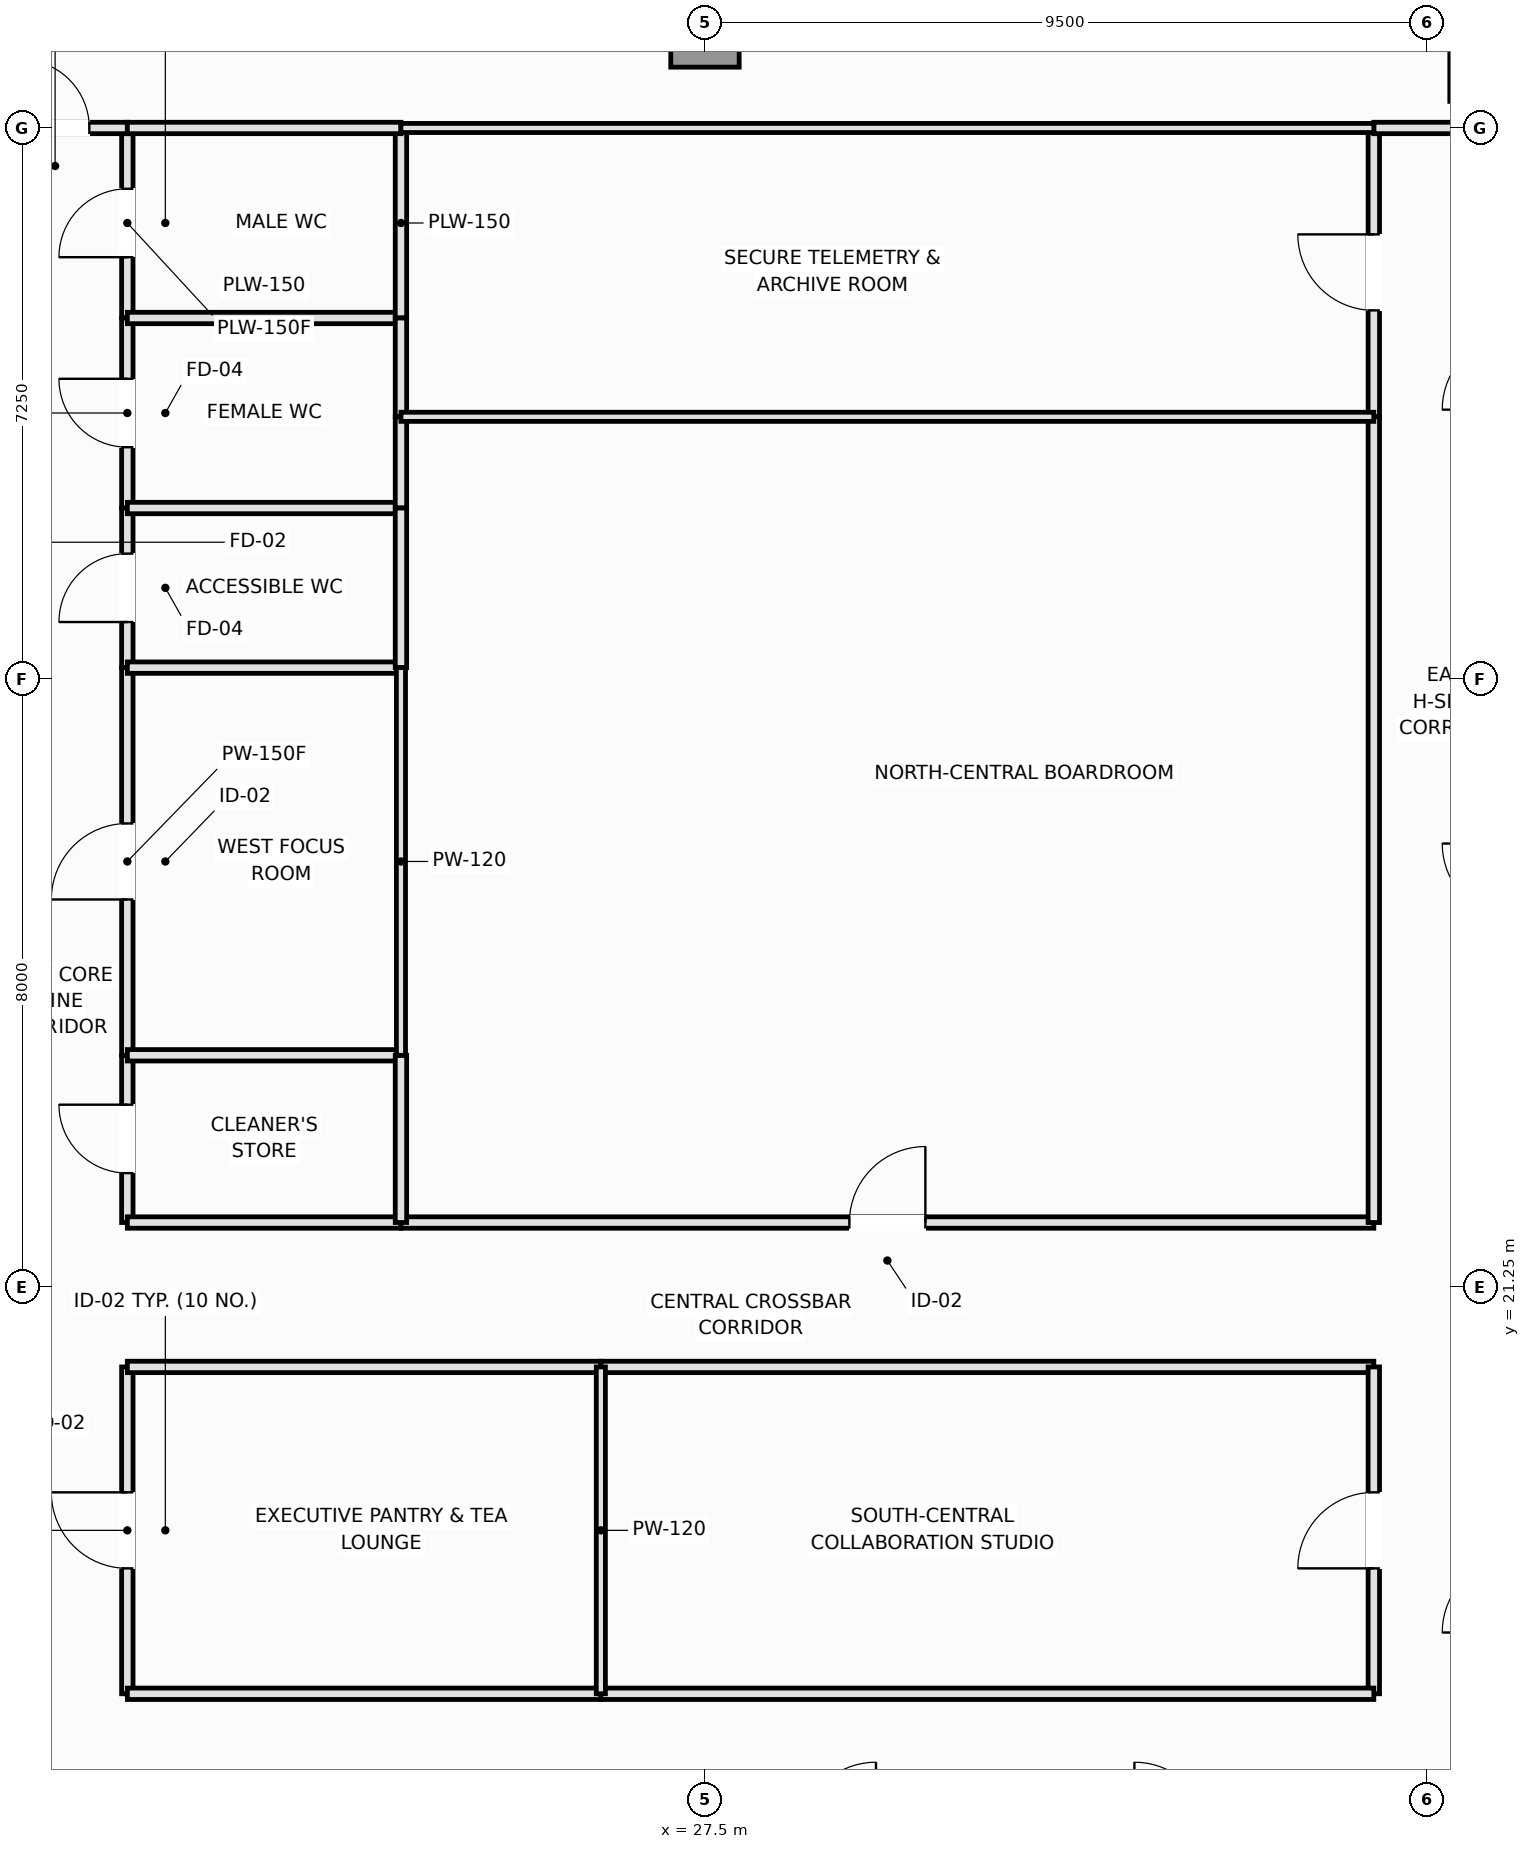
"""IFC4 building model, lengths in metres.
Left out: names, types, materials, properties, quantities, classifications, styles, units other than length and angle.
Written with IfcOpenShell. Run it as: python <this file> out.ifc"""

import sys

from ifc_helpers import new_model, si_unit, direction, frame, frame_2d, origin, origin_2d, place, context, subcontext, project, spatial, rectangle, extrude, element, fill, save


model = new_model("IFC4")
c1 = context("Model", 3, precision=1e-05, world=origin(), true_north=direction((0.0, 1.0)))
c2 = subcontext(c1, "Body", "Model", "MODEL_VIEW")
j1 = project(units=[si_unit("LENGTHUNIT", "METRE"), si_unit("PLANEANGLEUNIT", "RADIAN")], contexts=[c1])
p1 = place(None, origin())
s1 = spatial("IfcSite", under=j1, at=p1, CompositionType="ELEMENT")
p2 = place(p1, origin())
s2 = spatial("IfcBuilding", under=s1, at=p2, CompositionType="ELEMENT")
p3 = place(p2, frame((0.0, 0.0, 270.55)))
s3 = spatial("IfcBuildingStorey", under=s2, at=p3, CompositionType="ELEMENT", Elevation=270.55)
p4 = place(p3, frame((27.5, 37.75, 0.0), z_axis=(0.0, 0.0, 1.0), x_axis=(1.0, 0.0, 0.0)))
e1 = element("IfcColumn", 1, at=p4, inside=s3, PredefinedType="COLUMN", context=c2, shape_type="SweptSolid", body=[
    extrude(rectangle(XDim=0.9, YDim=0.9, at=origin_2d()), origin(), (0.0, 0.0, 1.0), 3.55),
])
p5 = place(p3, frame((19.9, 15.9, 0.0), z_axis=(0.0, 0.0, 1.0), x_axis=(0.0, 1.0, 0.0)))
e2 = element("IfcWall", 2, at=p5, inside=s3, PredefinedType="PARTITIONING", context=c2, shape_type="SweptSolid", body=[
    extrude(rectangle(XDim=4.3, YDim=0.15, at=frame_2d((2.15, 0.0))), origin(), (0.0, 0.0, 1.0), 3.39),
])
p6 = place(p5, frame((1.65, 0.0, 0.0)))
e3 = element("IfcOpeningElement", 3, at=p6, cuts=e2, PredefinedType="OPENING", context=c2, shape_type="SweptSolid", body=[
    extrude(rectangle(XDim=1.0, YDim=2.15, at=frame_2d((0.5, 1.075))), frame((0.0, 0.085, 0.0), z_axis=(0.0, -1.0, 0.0), x_axis=(1.0, 0.0, 0.0)), (0.0, 0.0, 1.0), 0.17),
])
p7 = place(p3, frame((19.9, 34.0, 0.0), z_axis=(0.0, 0.0, 1.0), x_axis=(0.0, 1.0, 0.0)))
e4 = element("IfcWall", 4, at=p7, inside=s3, PredefinedType="PLUMBINGWALL", context=c2, shape_type="SweptSolid", body=[
    extrude(rectangle(XDim=2.5, YDim=0.15, at=frame_2d((1.25, 0.0))), origin(), (0.0, 0.0, 1.0), 3.39),
])
p8 = place(p7, frame((0.8, 0.0, 0.0)))
e5 = element("IfcOpeningElement", 5, at=p8, cuts=e4, PredefinedType="OPENING", context=c2, shape_type="SweptSolid", body=[
    extrude(rectangle(XDim=0.9, YDim=2.1, at=frame_2d((0.45, 1.05))), frame((0.0, 0.085, 0.0), z_axis=(0.0, -1.0, 0.0), x_axis=(1.0, 0.0, 0.0)), (0.0, 0.0, 1.0), 0.17),
])
p9 = place(p3, frame((19.9, 31.5, 0.0), z_axis=(0.0, 0.0, 1.0), x_axis=(0.0, 1.0, 0.0)))
e6 = element("IfcWall", 6, at=p9, inside=s3, PredefinedType="PLUMBINGWALL", context=c2, shape_type="SweptSolid", body=[
    extrude(rectangle(XDim=2.5, YDim=0.15, at=frame_2d((1.25, 0.0))), origin(), (0.0, 0.0, 1.0), 3.39),
])
p10 = place(p9, frame((0.8, 0.0, 0.0)))
e7 = element("IfcOpeningElement", 7, at=p10, cuts=e6, PredefinedType="OPENING", context=c2, shape_type="SweptSolid", body=[
    extrude(rectangle(XDim=0.9, YDim=2.1, at=frame_2d((0.45, 1.05))), frame((0.0, 0.085, 0.0), z_axis=(0.0, -1.0, 0.0), x_axis=(1.0, 0.0, 0.0)), (0.0, 0.0, 1.0), 0.17),
])
p11 = place(p3, frame((19.9, 29.4, 0.0), z_axis=(0.0, 0.0, 1.0), x_axis=(0.0, 1.0, 0.0)))
e8 = element("IfcWall", 8, at=p11, inside=s3, PredefinedType="PLUMBINGWALL", context=c2, shape_type="SweptSolid", body=[
    extrude(rectangle(XDim=2.1, YDim=0.15, at=frame_2d((1.05, 0.0))), origin(), (0.0, 0.0, 1.0), 3.39),
])
p12 = place(p11, frame((0.6, 0.0, 0.0)))
e9 = element("IfcOpeningElement", 9, at=p12, cuts=e8, PredefinedType="OPENING", context=c2, shape_type="SweptSolid", body=[
    extrude(rectangle(XDim=0.9, YDim=2.1, at=frame_2d((0.45, 1.05))), frame((0.0, 0.085, 0.0), z_axis=(0.0, -1.0, 0.0), x_axis=(1.0, 0.0, 0.0)), (0.0, 0.0, 1.0), 0.17),
])
p13 = place(p3, frame((19.9, 22.1, 0.0), z_axis=(0.0, 0.0, 1.0), x_axis=(0.0, 1.0, 0.0)))
e10 = element("IfcWall", 10, at=p13, inside=s3, PredefinedType="PLUMBINGWALL", context=c2, shape_type="SweptSolid", body=[
    extrude(rectangle(XDim=2.2, YDim=0.15, at=frame_2d((1.1, 0.0))), origin(), (0.0, 0.0, 1.0), 3.39),
])
p14 = place(p13, frame((0.65, 0.0, 0.0)))
e11 = element("IfcOpeningElement", 11, at=p14, cuts=e10, PredefinedType="OPENING", context=c2, shape_type="SweptSolid", body=[
    extrude(rectangle(XDim=0.9, YDim=2.1, at=frame_2d((0.45, 1.05))), frame((0.0, 0.085, 0.0), z_axis=(0.0, -1.0, 0.0), x_axis=(1.0, 0.0, 0.0)), (0.0, 0.0, 1.0), 0.17),
])
p15 = place(p3, frame((19.9, 24.3, 0.0), z_axis=(0.0, 0.0, 1.0), x_axis=(0.0, 1.0, 0.0)))
e12 = element("IfcWall", 12, at=p15, inside=s3, PredefinedType="PARTITIONING", context=c2, shape_type="SweptSolid", body=[
    extrude(rectangle(XDim=5.1, YDim=0.15, at=frame_2d((2.55, 0.0))), origin(), (0.0, 0.0, 1.0), 3.39),
])
p16 = place(p15, frame((2.05, 0.0, 0.0)))
e13 = element("IfcOpeningElement", 13, at=p16, cuts=e12, PredefinedType="OPENING", context=c2, shape_type="SweptSolid", body=[
    extrude(rectangle(XDim=1.0, YDim=2.15, at=frame_2d((0.5, 1.075))), frame((0.0, 0.085, 0.0), z_axis=(0.0, -1.0, 0.0), x_axis=(1.0, 0.0, 0.0)), (0.0, 0.0, 1.0), 0.17),
])
p17 = place(p3, frame((18.0, 36.5, 0.0), z_axis=(0.0, 0.0, 1.0), x_axis=(1.0, 0.0, 0.0)))
e14 = element("IfcWall", 14, at=p17, inside=s3, PredefinedType="PARTITIONING", context=c2, shape_type="SweptSolid", body=[
    extrude(rectangle(XDim=1.9, YDim=0.15, at=frame_2d((0.95, 0.0))), origin(), (0.0, 0.0, 1.0), 3.39),
])
p18 = place(p17, frame((0.5, 0.0, 0.0)))
e15 = element("IfcOpeningElement", 15, at=p18, cuts=e14, PredefinedType="OPENING", context=c2, shape_type="SweptSolid", body=[
    extrude(rectangle(XDim=0.9, YDim=2.1, at=frame_2d((0.45, 1.05))), frame((0.0, 0.085, 0.0), z_axis=(0.0, -1.0, 0.0), x_axis=(1.0, 0.0, 0.0)), (0.0, 0.0, 1.0), 0.17),
])
p19 = place(p3, frame((19.9, 20.2, 0.0), z_axis=(0.0, 0.0, 1.0), x_axis=(1.0, 0.0, 0.0)))
e16 = element("IfcWall", 16, at=p19, inside=s3, PredefinedType="PARTITIONING", context=c2, shape_type="SweptSolid", body=[
    extrude(rectangle(XDim=6.23, YDim=0.15, at=frame_2d((3.115, 0.0))), origin(), (0.0, 0.0, 1.0), 3.39),
])
p20 = place(p3, frame((26.13, 20.2, 0.0), z_axis=(0.0, 0.0, 1.0), x_axis=(1.0, 0.0, 0.0)))
e17 = element("IfcWall", 17, at=p20, inside=s3, PredefinedType="PARTITIONING", context=c2, shape_type="SweptSolid", body=[
    extrude(rectangle(XDim=10.17, YDim=0.15, at=frame_2d((5.085, 0.0))), origin(), (0.0, 0.0, 1.0), 3.39),
])
p21 = place(p3, frame((19.9, 22.1, 0.0), z_axis=(0.0, 0.0, 1.0), x_axis=(1.0, 0.0, 0.0)))
e18 = element("IfcWall", 18, at=p21, inside=s3, PredefinedType="PLUMBINGWALL", context=c2, shape_type="SweptSolid", body=[
    extrude(rectangle(XDim=3.6, YDim=0.15, at=frame_2d((1.8, 0.0))), origin(), (0.0, 0.0, 1.0), 3.39),
])
p22 = place(p3, frame((23.5, 22.1, 0.0), z_axis=(0.0, 0.0, 1.0), x_axis=(1.0, 0.0, 0.0)))
e19 = element("IfcWall", 19, at=p22, inside=s3, PredefinedType="PARTITIONING", context=c2, shape_type="SweptSolid", body=[
    extrude(rectangle(XDim=12.8, YDim=0.15, at=frame_2d((6.4, 0.0))), origin(), (0.0, 0.0, 1.0), 3.39),
])
p23 = place(p22, frame((5.9, 0.0, 0.0)))
e20 = element("IfcOpeningElement", 20, at=p23, cuts=e19, PredefinedType="OPENING", context=c2, shape_type="SweptSolid", body=[
    extrude(rectangle(XDim=1.0, YDim=2.15, at=frame_2d((0.5, 1.075))), frame((0.0, 0.085, 0.0), z_axis=(0.0, -1.0, 0.0), x_axis=(1.0, 0.0, 0.0)), (0.0, 0.0, 1.0), 0.17),
])
p24 = place(p3, frame((36.3, 15.9, 0.0), z_axis=(0.0, 0.0, 1.0), x_axis=(0.0, 1.0, 0.0)))
e21 = element("IfcWall", 21, at=p24, inside=s3, PredefinedType="PARTITIONING", context=c2, shape_type="SweptSolid", body=[
    extrude(rectangle(XDim=4.3, YDim=0.15, at=frame_2d((2.15, 0.0))), origin(), (0.0, 0.0, 1.0), 3.39),
])
p25 = place(p24, frame((1.65, 0.0, 0.0)))
e22 = element("IfcOpeningElement", 22, at=p25, cuts=e21, PredefinedType="OPENING", context=c2, shape_type="SweptSolid", body=[
    extrude(rectangle(XDim=1.0, YDim=2.15, at=frame_2d((0.5, 1.075))), frame((0.0, 0.085, 0.0), z_axis=(0.0, -1.0, 0.0), x_axis=(1.0, 0.0, 0.0)), (0.0, 0.0, 1.0), 0.17),
])
p26 = place(p3, frame((36.3, 32.7, 0.0), z_axis=(0.0, 0.0, 1.0), x_axis=(0.0, 1.0, 0.0)))
e23 = element("IfcWall", 23, at=p26, inside=s3, PredefinedType="PARTITIONING", context=c2, shape_type="SweptSolid", body=[
    extrude(rectangle(XDim=3.8, YDim=0.15, at=frame_2d((1.9, 0.0))), origin(), (0.0, 0.0, 1.0), 3.39),
])
p27 = place(p26, frame((1.4, 0.0, 0.0)))
e24 = element("IfcOpeningElement", 24, at=p27, cuts=e23, PredefinedType="OPENING", context=c2, shape_type="SweptSolid", body=[
    extrude(rectangle(XDim=1.0, YDim=2.15, at=frame_2d((0.5, 1.075))), frame((0.0, 0.085, 0.0), z_axis=(0.0, -1.0, 0.0), x_axis=(1.0, 0.0, 0.0)), (0.0, 0.0, 1.0), 0.17),
])
p28 = place(p3, frame((36.3, 22.1, 0.0), z_axis=(0.0, 0.0, 1.0), x_axis=(0.0, 1.0, 0.0)))
e25 = element("IfcWall", 25, at=p28, inside=s3, PredefinedType="PARTITIONING", context=c2, shape_type="SweptSolid", body=[
    extrude(rectangle(XDim=10.6, YDim=0.15, at=frame_2d((5.3, 0.0))), origin(), (0.0, 0.0, 1.0), 3.39),
])
p29 = place(p3, frame((36.3, 36.5, 0.0), z_axis=(0.0, 0.0, 1.0), x_axis=(1.0, 0.0, 0.0)))
e26 = element("IfcWall", 26, at=p29, inside=s3, PredefinedType="PARTITIONING", context=c2, shape_type="SweptSolid", body=[
    extrude(rectangle(XDim=1.9, YDim=0.15, at=frame_2d((0.95, 0.0))), origin(), (0.0, 0.0, 1.0), 3.39),
])
p30 = place(p3, frame((19.9, 15.9, 0.0), z_axis=(0.0, 0.0, 1.0), x_axis=(1.0, 0.0, 0.0)))
e27 = element("IfcWall", 27, at=p30, inside=s3, PredefinedType="PARTITIONING", context=c2, shape_type="SweptSolid", body=[
    extrude(rectangle(XDim=6.23, YDim=0.15, at=frame_2d((3.115, 0.0))), origin(), (0.0, 0.0, 1.0), 3.39),
])
p31 = place(p3, frame((26.13, 15.9, 0.0), z_axis=(0.0, 0.0, 1.0), x_axis=(1.0, 0.0, 0.0)))
e28 = element("IfcWall", 28, at=p31, inside=s3, PredefinedType="PARTITIONING", context=c2, shape_type="SweptSolid", body=[
    extrude(rectangle(XDim=10.17, YDim=0.15, at=frame_2d((5.085, 0.0))), origin(), (0.0, 0.0, 1.0), 3.39),
])
p32 = place(p3, frame((26.13, 15.9, 0.0), z_axis=(0.0, 0.0, 1.0), x_axis=(0.0, 1.0, 0.0)))
e29 = element("IfcWall", 29, at=p32, inside=s3, PredefinedType="PARTITIONING", context=c2, shape_type="SweptSolid", body=[
    extrude(rectangle(XDim=4.3, YDim=0.12, at=frame_2d((2.15, 0.0))), origin(), (0.0, 0.0, 1.0), 3.39),
])
p33 = place(p3, frame((19.9, 34.0, 0.0), z_axis=(0.0, 0.0, 1.0), x_axis=(1.0, 0.0, 0.0)))
e30 = element("IfcWall", 30, at=p33, inside=s3, PredefinedType="PLUMBINGWALL", context=c2, shape_type="SweptSolid", body=[
    extrude(rectangle(XDim=3.6, YDim=0.15, at=frame_2d((1.8, 0.0))), origin(), (0.0, 0.0, 1.0), 3.39),
])
p34 = place(p3, frame((23.5, 34.0, 0.0), z_axis=(0.0, 0.0, 1.0), x_axis=(0.0, 1.0, 0.0)))
e31 = element("IfcWall", 31, at=p34, inside=s3, PredefinedType="PLUMBINGWALL", context=c2, shape_type="SweptSolid", body=[
    extrude(rectangle(XDim=2.5, YDim=0.15, at=frame_2d((1.25, 0.0))), origin(), (0.0, 0.0, 1.0), 3.39),
])
for number, where, z_axis, x_axis in (
    (32, (19.9, 36.5, 0.0), (0.0, 0.0, 1.0), (1.0, 0.0, 0.0)),
    (33, (19.9, 31.5, 0.0), (0.0, 0.0, 1.0), (1.0, 0.0, 0.0)),
):
    element("IfcWall", number, at=place(p3, frame(where, z_axis=z_axis, x_axis=x_axis)), inside=s3, PredefinedType="PLUMBINGWALL", context=c2, shape_type="SweptSolid", body=[
        extrude(rectangle(XDim=3.6, YDim=0.15, at=frame_2d((1.8, 0.0))), origin(), (0.0, 0.0, 1.0), 3.39),
    ])
p35 = place(p3, frame((23.5, 32.7, 0.0), z_axis=(0.0, 0.0, 1.0), x_axis=(0.0, 1.0, 0.0)))
e34 = element("IfcWall", 34, at=p35, inside=s3, PredefinedType="PLUMBINGWALL", context=c2, shape_type="SweptSolid", body=[
    extrude(rectangle(XDim=1.3, YDim=0.15, at=frame_2d((0.65, 0.0))), origin(), (0.0, 0.0, 1.0), 3.39),
])
p36 = place(p3, frame((23.5, 31.5, 0.0), z_axis=(0.0, 0.0, 1.0), x_axis=(0.0, 1.0, 0.0)))
e35 = element("IfcWall", 35, at=p36, inside=s3, PredefinedType="PLUMBINGWALL", context=c2, shape_type="SweptSolid", body=[
    extrude(rectangle(XDim=1.2, YDim=0.15, at=frame_2d((0.6, 0.0))), origin(), (0.0, 0.0, 1.0), 3.39),
])
p37 = place(p3, frame((19.9, 29.4, 0.0), z_axis=(0.0, 0.0, 1.0), x_axis=(1.0, 0.0, 0.0)))
e36 = element("IfcWall", 36, at=p37, inside=s3, PredefinedType="PLUMBINGWALL", context=c2, shape_type="SweptSolid", body=[
    extrude(rectangle(XDim=3.6, YDim=0.15, at=frame_2d((1.8, 0.0))), origin(), (0.0, 0.0, 1.0), 3.39),
])
p38 = place(p3, frame((23.5, 29.4, 0.0), z_axis=(0.0, 0.0, 1.0), x_axis=(0.0, 1.0, 0.0)))
e37 = element("IfcWall", 37, at=p38, inside=s3, PredefinedType="PLUMBINGWALL", context=c2, shape_type="SweptSolid", body=[
    extrude(rectangle(XDim=2.1, YDim=0.15, at=frame_2d((1.05, 0.0))), origin(), (0.0, 0.0, 1.0), 3.39),
])
p39 = place(p3, frame((19.9, 24.3, 0.0), z_axis=(0.0, 0.0, 1.0), x_axis=(1.0, 0.0, 0.0)))
e38 = element("IfcWall", 38, at=p39, inside=s3, PredefinedType="PLUMBINGWALL", context=c2, shape_type="SweptSolid", body=[
    extrude(rectangle(XDim=3.6, YDim=0.15, at=frame_2d((1.8, 0.0))), origin(), (0.0, 0.0, 1.0), 3.39),
])
p40 = place(p3, frame((23.5, 22.1, 0.0), z_axis=(0.0, 0.0, 1.0), x_axis=(0.0, 1.0, 0.0)))
e39 = element("IfcWall", 39, at=p40, inside=s3, PredefinedType="PLUMBINGWALL", context=c2, shape_type="SweptSolid", body=[
    extrude(rectangle(XDim=2.2, YDim=0.15, at=frame_2d((1.1, 0.0))), origin(), (0.0, 0.0, 1.0), 3.39),
])
p41 = place(p3, frame((23.5, 24.3, 0.0), z_axis=(0.0, 0.0, 1.0), x_axis=(0.0, 1.0, 0.0)))
e40 = element("IfcWall", 40, at=p41, inside=s3, PredefinedType="PARTITIONING", context=c2, shape_type="SweptSolid", body=[
    extrude(rectangle(XDim=5.1, YDim=0.12, at=frame_2d((2.55, 0.0))), origin(), (0.0, 0.0, 1.0), 3.39),
])
for number, where, z_axis, x_axis in (
    (41, (23.5, 32.7, 0.0), (0.0, 0.0, 1.0), (1.0, 0.0, 0.0)),
    (42, (23.5, 36.5, 0.0), (0.0, 0.0, 1.0), (1.0, 0.0, 0.0)),
):
    element("IfcWall", number, at=place(p3, frame(where, z_axis=z_axis, x_axis=x_axis)), inside=s3, PredefinedType="PARTITIONING", context=c2, shape_type="SweptSolid", body=[
        extrude(rectangle(XDim=12.8, YDim=0.12, at=frame_2d((6.4, 0.0))), origin(), (0.0, 0.0, 1.0), 3.39),
    ])
p42 = place(p6, origin())
e43 = element("IfcDoor", 43, at=p42, inside=s3, OperationType="SINGLE_SWING_RIGHT", PredefinedType="DOOR", context=c2, shape_type="SweptSolid", body=[
    extrude(rectangle(XDim=1.0, YDim=2.15, at=frame_2d((0.5, 1.075))), frame((0.0, 0.025, 0.0), z_axis=(0.0, -1.0, 0.0), x_axis=(1.0, 0.0, 0.0)), (0.0, 0.0, 1.0), 0.05),
])
fill(e3, e43)
p43 = place(p8, origin())
e44 = element("IfcDoor", 44, at=p43, inside=s3, OperationType="SINGLE_SWING_LEFT", PredefinedType="DOOR", context=c2, shape_type="SweptSolid", body=[
    extrude(rectangle(XDim=0.9, YDim=2.1, at=frame_2d((0.45, 1.05))), frame((0.0, 0.025, 0.0), z_axis=(0.0, -1.0, 0.0), x_axis=(1.0, 0.0, 0.0)), (0.0, 0.0, 1.0), 0.05),
])
fill(e5, e44)
p44 = place(p10, origin())
e45 = element("IfcDoor", 45, at=p44, inside=s3, OperationType="SINGLE_SWING_RIGHT", PredefinedType="DOOR", context=c2, shape_type="SweptSolid", body=[
    extrude(rectangle(XDim=0.9, YDim=2.1, at=frame_2d((0.45, 1.05))), frame((0.0, 0.025, 0.0), z_axis=(0.0, -1.0, 0.0), x_axis=(1.0, 0.0, 0.0)), (0.0, 0.0, 1.0), 0.05),
])
fill(e7, e45)
p45 = place(p12, origin())
e46 = element("IfcDoor", 46, at=p45, inside=s3, OperationType="SINGLE_SWING_LEFT", PredefinedType="DOOR", context=c2, shape_type="SweptSolid", body=[
    extrude(rectangle(XDim=0.9, YDim=2.1, at=frame_2d((0.45, 1.05))), frame((0.0, 0.025, 0.0), z_axis=(0.0, -1.0, 0.0), x_axis=(1.0, 0.0, 0.0)), (0.0, 0.0, 1.0), 0.05),
])
fill(e9, e46)
p46 = place(p14, origin())
e47 = element("IfcDoor", 47, at=p46, inside=s3, OperationType="SINGLE_SWING_RIGHT", PredefinedType="DOOR", context=c2, shape_type="SweptSolid", body=[
    extrude(rectangle(XDim=0.9, YDim=2.1, at=frame_2d((0.45, 1.05))), frame((0.0, 0.025, 0.0), z_axis=(0.0, -1.0, 0.0), x_axis=(1.0, 0.0, 0.0)), (0.0, 0.0, 1.0), 0.05),
])
fill(e11, e47)
p47 = place(p16, origin())
e48 = element("IfcDoor", 48, at=p47, inside=s3, OperationType="SINGLE_SWING_LEFT", PredefinedType="DOOR", context=c2, shape_type="SweptSolid", body=[
    extrude(rectangle(XDim=1.0, YDim=2.15, at=frame_2d((0.5, 1.075))), frame((0.0, 0.025, 0.0), z_axis=(0.0, -1.0, 0.0), x_axis=(1.0, 0.0, 0.0)), (0.0, 0.0, 1.0), 0.05),
])
fill(e13, e48)
p48 = place(p18, origin())
e49 = element("IfcDoor", 49, at=p48, inside=s3, OperationType="SINGLE_SWING_LEFT", PredefinedType="DOOR", context=c2, shape_type="SweptSolid", body=[
    extrude(rectangle(XDim=0.9, YDim=2.1, at=frame_2d((0.45, 1.05))), frame((0.0, 0.025, 0.0), z_axis=(0.0, -1.0, 0.0), x_axis=(1.0, 0.0, 0.0)), (0.0, 0.0, 1.0), 0.05),
])
fill(e15, e49)
p49 = place(p23, origin())
e50 = element("IfcDoor", 50, at=p49, inside=s3, OperationType="SINGLE_SWING_RIGHT", PredefinedType="DOOR", context=c2, shape_type="SweptSolid", body=[
    extrude(rectangle(XDim=1.0, YDim=2.15, at=frame_2d((0.5, 1.075))), frame((0.0, 0.025, 0.0), z_axis=(0.0, -1.0, 0.0), x_axis=(1.0, 0.0, 0.0)), (0.0, 0.0, 1.0), 0.05),
])
fill(e20, e50)
p50 = place(p25, origin())
e51 = element("IfcDoor", 51, at=p50, inside=s3, OperationType="SINGLE_SWING_LEFT", PredefinedType="DOOR", context=c2, shape_type="SweptSolid", body=[
    extrude(rectangle(XDim=1.0, YDim=2.15, at=frame_2d((0.5, 1.075))), frame((0.0, 0.025, 0.0), z_axis=(0.0, -1.0, 0.0), x_axis=(1.0, 0.0, 0.0)), (0.0, 0.0, 1.0), 0.05),
])
fill(e22, e51)
p51 = place(p27, origin())
e52 = element("IfcDoor", 52, at=p51, inside=s3, OperationType="SINGLE_SWING_RIGHT", PredefinedType="DOOR", context=c2, shape_type="SweptSolid", body=[
    extrude(rectangle(XDim=1.0, YDim=2.15, at=frame_2d((0.5, 1.075))), frame((0.0, 0.025, 0.0), z_axis=(0.0, -1.0, 0.0), x_axis=(1.0, 0.0, 0.0)), (0.0, 0.0, 1.0), 0.05),
])
fill(e24, e52)
save(model, sys.argv[1])
